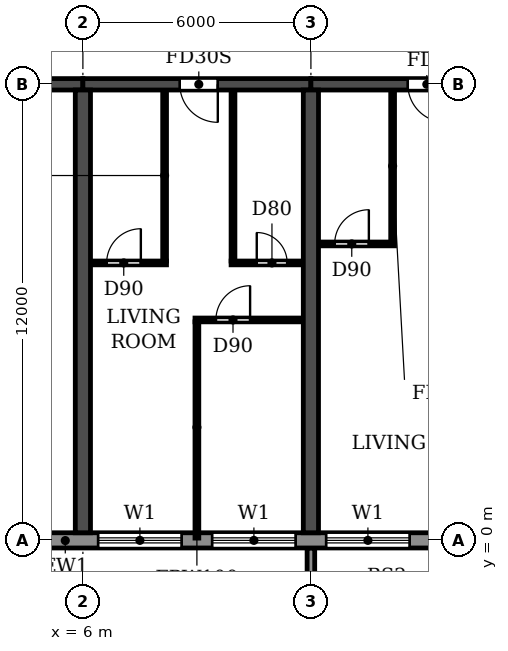
"""IFC4 building model, lengths in metres.
Left out: names, types, materials, properties, quantities, classifications, styles, units other than length and angle.
Written with IfcOpenShell. Run it as: python <this file> out.ifc"""

import sys

from ifc_helpers import new_model, si_unit, direction, frame, frame_2d, origin, place, context, subcontext, project, spatial, polyline, rectangle, outline, extrude, source, transform, mapped, element, fill, save


model = new_model("IFC4")
c1 = context("Model", 3, precision=1e-05, world=origin(), true_north=direction((0.0, 1.0)))
c2 = subcontext(c1, "Body", "Model", "MODEL_VIEW")
j1 = project(units=[si_unit("LENGTHUNIT", "METRE"), si_unit("PLANEANGLEUNIT", "RADIAN")], contexts=[c1])
p1 = place(None, origin())
s1 = spatial("IfcSite", under=j1, at=p1, CompositionType="ELEMENT")
p2 = place(p1, origin())
s2 = spatial("IfcBuilding", under=s1, at=p2, CompositionType="ELEMENT")
p3 = place(p2, frame((0.0, 0.0, 49.8)))
s3 = spatial("IfcBuildingStorey", under=s2, at=p3, CompositionType="ELEMENT", Elevation=49.8)
for number, where, z_axis, x_axis in (
    (1, (6.0, 0.2, 0.0), (0.0, 0.0, 1.0), (0.0, 1.0, 0.0)),
    (2, (12.0, 0.2, 0.0), (0.0, 0.0, 1.0), (0.0, 1.0, 0.0)),
):
    element("IfcWall", number, at=place(p3, frame(where, z_axis=z_axis, x_axis=x_axis)), inside=s3, PredefinedType="SHEAR", context=c2, shape_type="SweptSolid", body=[
        extrude(rectangle(XDim=11.65, YDim=0.4, at=frame_2d((5.825, 0.0))), origin(), (0.0, 0.0, 1.0), 3.0),
    ])
p4 = place(p3, frame((0.2, 12.0, 0.0), z_axis=(0.0, 0.0, 1.0), x_axis=(1.0, 0.0, 0.0)))
e3 = element("IfcWall", 3, at=p4, inside=s3, PredefinedType="SHEAR", context=c2, shape_type="SweptSolid", body=[
    extrude(rectangle(XDim=5.8, YDim=0.3, at=frame_2d((2.9, 0.0))), origin(), (0.0, 0.0, 1.0), 2.4),
])
p5 = place(p4, frame((2.3, 0.0, 0.0)))
e4 = element("IfcOpeningElement", 4, at=p5, cuts=e3, PredefinedType="OPENING", context=c2, shape_type="SweptSolid", body=[
    extrude(rectangle(XDim=1.0, YDim=2.1, at=frame_2d((0.5, 1.05))), frame((0.0, 0.16, 0.0), z_axis=(0.0, -1.0, 0.0), x_axis=(1.0, 0.0, 0.0)), (0.0, 0.0, 1.0), 0.32),
])
p6 = place(p3, frame((6.0, 12.0, 0.0), z_axis=(0.0, 0.0, 1.0), x_axis=(1.0, 0.0, 0.0)))
e5 = element("IfcWall", 5, at=p6, inside=s3, PredefinedType="SHEAR", context=c2, shape_type="SweptSolid", body=[
    extrude(rectangle(XDim=6.0, YDim=0.3, at=frame_2d((3.0, 0.0))), origin(), (0.0, 0.0, 1.0), 2.4),
])
p7 = place(p6, frame((2.55, 0.0, 0.0)))
e6 = element("IfcOpeningElement", 6, at=p7, cuts=e5, PredefinedType="OPENING", context=c2, shape_type="SweptSolid", body=[
    extrude(rectangle(XDim=1.0, YDim=2.1, at=frame_2d((0.5, 1.05))), frame((0.0, 0.16, 0.0), z_axis=(0.0, -1.0, 0.0), x_axis=(1.0, 0.0, 0.0)), (0.0, 0.0, 1.0), 0.32),
])
p8 = place(p3, frame((12.0, 12.0, 0.0), z_axis=(0.0, 0.0, 1.0), x_axis=(1.0, 0.0, 0.0)))
e7 = element("IfcWall", 7, at=p8, inside=s3, PredefinedType="SHEAR", context=c2, shape_type="SweptSolid", body=[
    extrude(rectangle(XDim=6.0, YDim=0.3, at=frame_2d((3.0, 0.0))), origin(), (0.0, 0.0, 1.0), 2.4),
])
p9 = place(p8, frame((2.55, 0.0, 0.0)))
e8 = element("IfcOpeningElement", 8, at=p9, cuts=e7, PredefinedType="OPENING", context=c2, shape_type="SweptSolid", body=[
    extrude(rectangle(XDim=1.0, YDim=2.1, at=frame_2d((0.5, 1.05))), frame((0.0, 0.16, 0.0), z_axis=(0.0, -1.0, 0.0), x_axis=(1.0, 0.0, 0.0)), (0.0, 0.0, 1.0), 0.32),
])
p10 = place(p3, frame((4.683, 0.0, 0.0), z_axis=(0.0, 0.0, 1.0), x_axis=(1.0, 0.0, 0.0)))
e9 = element("IfcWall", 9, at=p10, inside=s3, PredefinedType="STANDARD", context=c2, shape_type="SweptSolid", body=[
    extrude(rectangle(XDim=92.634, YDim=0.4, at=frame_2d((46.317, 0.0))), origin(), (0.0, 0.0, 1.0), 3.0),
])
p11 = place(p10, frame((1.717, 0.0, 0.9)))
e10 = element("IfcOpeningElement", 10, at=p11, cuts=e9, PredefinedType="OPENING", context=c2, shape_type="SweptSolid", body=[
    extrude(rectangle(XDim=2.2, YDim=1.5, at=frame_2d((1.1, 0.75))), frame((0.0, 0.21, 0.0), z_axis=(0.0, -1.0, 0.0), x_axis=(1.0, 0.0, 0.0)), (0.0, 0.0, 1.0), 0.42),
])
p12 = place(p10, frame((4.717, 0.0, 0.9)))
e11 = element("IfcOpeningElement", 11, at=p12, cuts=e9, PredefinedType="OPENING", context=c2, shape_type="SweptSolid", body=[
    extrude(rectangle(XDim=2.2, YDim=1.5, at=frame_2d((1.1, 0.75))), frame((0.0, 0.21, 0.0), z_axis=(0.0, -1.0, 0.0), x_axis=(1.0, 0.0, 0.0)), (0.0, 0.0, 1.0), 0.42),
])
p13 = place(p10, frame((7.717, 0.0, 0.9)))
e12 = element("IfcOpeningElement", 12, at=p13, cuts=e9, PredefinedType="OPENING", context=c2, shape_type="SweptSolid", body=[
    extrude(rectangle(XDim=2.2, YDim=1.5, at=frame_2d((1.1, 0.75))), frame((0.0, 0.21, 0.0), z_axis=(0.0, -1.0, 0.0), x_axis=(1.0, 0.0, 0.0)), (0.0, 0.0, 1.0), 0.42),
])
p14 = place(p10, frame((10.917, 0.0, 0.0)))
e13 = element("IfcOpeningElement", 13, at=p14, cuts=e9, PredefinedType="OPENING", context=c2, shape_type="SweptSolid", body=[
    extrude(rectangle(XDim=1.8, YDim=2.4, at=frame_2d((0.9, 1.2))), frame((0.0, 0.21, 0.0), z_axis=(0.0, -1.0, 0.0), x_axis=(1.0, 0.0, 0.0)), (0.0, 0.0, 1.0), 0.42),
])
p15 = place(p10, frame((13.717, 0.0, 0.9)))
e14 = element("IfcOpeningElement", 14, at=p15, cuts=e9, PredefinedType="OPENING", context=c2, shape_type="SweptSolid", body=[
    extrude(rectangle(XDim=2.2, YDim=1.5, at=frame_2d((1.1, 0.75))), frame((0.0, 0.21, 0.0), z_axis=(0.0, -1.0, 0.0), x_axis=(1.0, 0.0, 0.0)), (0.0, 0.0, 1.0), 0.42),
])
p16 = place(p10, frame((16.717, 0.0, 0.9)))
e15 = element("IfcOpeningElement", 15, at=p16, cuts=e9, PredefinedType="OPENING", context=c2, shape_type="SweptSolid", body=[
    extrude(rectangle(XDim=2.2, YDim=1.5, at=frame_2d((1.1, 0.75))), frame((0.0, 0.21, 0.0), z_axis=(0.0, -1.0, 0.0), x_axis=(1.0, 0.0, 0.0)), (0.0, 0.0, 1.0), 0.42),
])
p17 = place(p10, frame((19.917, 0.0, 0.0)))
e16 = element("IfcOpeningElement", 16, at=p17, cuts=e9, PredefinedType="OPENING", context=c2, shape_type="SweptSolid", body=[
    extrude(rectangle(XDim=1.8, YDim=2.4, at=frame_2d((0.9, 1.2))), frame((0.0, 0.21, 0.0), z_axis=(0.0, -1.0, 0.0), x_axis=(1.0, 0.0, 0.0)), (0.0, 0.0, 1.0), 0.42),
])
p18 = place(p10, frame((22.717, 0.0, 0.9)))
e17 = element("IfcOpeningElement", 17, at=p18, cuts=e9, PredefinedType="OPENING", context=c2, shape_type="SweptSolid", body=[
    extrude(rectangle(XDim=2.2, YDim=1.5, at=frame_2d((1.1, 0.75))), frame((0.0, 0.21, 0.0), z_axis=(0.0, -1.0, 0.0), x_axis=(1.0, 0.0, 0.0)), (0.0, 0.0, 1.0), 0.42),
])
p19 = place(p10, frame((25.717, 0.0, 0.9)))
e18 = element("IfcOpeningElement", 18, at=p19, cuts=e9, PredefinedType="OPENING", context=c2, shape_type="SweptSolid", body=[
    extrude(rectangle(XDim=2.2, YDim=1.5, at=frame_2d((1.1, 0.75))), frame((0.0, 0.21, 0.0), z_axis=(0.0, -1.0, 0.0), x_axis=(1.0, 0.0, 0.0)), (0.0, 0.0, 1.0), 0.42),
])
p20 = place(p10, frame((28.717, 0.0, 0.9)))
e19 = element("IfcOpeningElement", 19, at=p20, cuts=e9, PredefinedType="OPENING", context=c2, shape_type="SweptSolid", body=[
    extrude(rectangle(XDim=2.2, YDim=1.5, at=frame_2d((1.1, 0.75))), frame((0.0, 0.21, 0.0), z_axis=(0.0, -1.0, 0.0), x_axis=(1.0, 0.0, 0.0)), (0.0, 0.0, 1.0), 0.42),
])
p21 = place(p10, frame((31.717, 0.0, 0.9)))
e20 = element("IfcOpeningElement", 20, at=p21, cuts=e9, PredefinedType="OPENING", context=c2, shape_type="SweptSolid", body=[
    extrude(rectangle(XDim=2.2, YDim=1.5, at=frame_2d((1.1, 0.75))), frame((0.0, 0.21, 0.0), z_axis=(0.0, -1.0, 0.0), x_axis=(1.0, 0.0, 0.0)), (0.0, 0.0, 1.0), 0.42),
])
p22 = place(p10, frame((34.917, 0.0, 0.0)))
e21 = element("IfcOpeningElement", 21, at=p22, cuts=e9, PredefinedType="OPENING", context=c2, shape_type="SweptSolid", body=[
    extrude(rectangle(XDim=1.8, YDim=2.4, at=frame_2d((0.9, 1.2))), frame((0.0, 0.21, 0.0), z_axis=(0.0, -1.0, 0.0), x_axis=(1.0, 0.0, 0.0)), (0.0, 0.0, 1.0), 0.42),
])
p23 = place(p10, frame((37.717, 0.0, 0.9)))
e22 = element("IfcOpeningElement", 22, at=p23, cuts=e9, PredefinedType="OPENING", context=c2, shape_type="SweptSolid", body=[
    extrude(rectangle(XDim=2.2, YDim=1.5, at=frame_2d((1.1, 0.75))), frame((0.0, 0.21, 0.0), z_axis=(0.0, -1.0, 0.0), x_axis=(1.0, 0.0, 0.0)), (0.0, 0.0, 1.0), 0.42),
])
p24 = place(p10, frame((40.717, 0.0, 0.9)))
e23 = element("IfcOpeningElement", 23, at=p24, cuts=e9, PredefinedType="OPENING", context=c2, shape_type="SweptSolid", body=[
    extrude(rectangle(XDim=2.2, YDim=1.5, at=frame_2d((1.1, 0.75))), frame((0.0, 0.21, 0.0), z_axis=(0.0, -1.0, 0.0), x_axis=(1.0, 0.0, 0.0)), (0.0, 0.0, 1.0), 0.42),
])
p25 = place(p10, frame((43.717, 0.0, 0.9)))
e24 = element("IfcOpeningElement", 24, at=p25, cuts=e9, PredefinedType="OPENING", context=c2, shape_type="SweptSolid", body=[
    extrude(rectangle(XDim=2.2, YDim=1.5, at=frame_2d((1.1, 0.75))), frame((0.0, 0.21, 0.0), z_axis=(0.0, -1.0, 0.0), x_axis=(1.0, 0.0, 0.0)), (0.0, 0.0, 1.0), 0.42),
])
p26 = place(p10, frame((46.917, 0.0, 0.0)))
e25 = element("IfcOpeningElement", 25, at=p26, cuts=e9, PredefinedType="OPENING", context=c2, shape_type="SweptSolid", body=[
    extrude(rectangle(XDim=1.8, YDim=2.4, at=frame_2d((0.9, 1.2))), frame((0.0, 0.21, 0.0), z_axis=(0.0, -1.0, 0.0), x_axis=(1.0, 0.0, 0.0)), (0.0, 0.0, 1.0), 0.42),
])
p27 = place(p10, frame((49.717, 0.0, 0.9)))
e26 = element("IfcOpeningElement", 26, at=p27, cuts=e9, PredefinedType="OPENING", context=c2, shape_type="SweptSolid", body=[
    extrude(rectangle(XDim=2.2, YDim=1.5, at=frame_2d((1.1, 0.75))), frame((0.0, 0.21, 0.0), z_axis=(0.0, -1.0, 0.0), x_axis=(1.0, 0.0, 0.0)), (0.0, 0.0, 1.0), 0.42),
])
p28 = place(p10, frame((52.717, 0.0, 0.9)))
e27 = element("IfcOpeningElement", 27, at=p28, cuts=e9, PredefinedType="OPENING", context=c2, shape_type="SweptSolid", body=[
    extrude(rectangle(XDim=2.2, YDim=1.5, at=frame_2d((1.1, 0.75))), frame((0.0, 0.21, 0.0), z_axis=(0.0, -1.0, 0.0), x_axis=(1.0, 0.0, 0.0)), (0.0, 0.0, 1.0), 0.42),
])
p29 = place(p10, frame((55.717, 0.0, 0.9)))
e28 = element("IfcOpeningElement", 28, at=p29, cuts=e9, PredefinedType="OPENING", context=c2, shape_type="SweptSolid", body=[
    extrude(rectangle(XDim=2.2, YDim=1.5, at=frame_2d((1.1, 0.75))), frame((0.0, 0.21, 0.0), z_axis=(0.0, -1.0, 0.0), x_axis=(1.0, 0.0, 0.0)), (0.0, 0.0, 1.0), 0.42),
])
p30 = place(p10, frame((58.917, 0.0, 0.0)))
e29 = element("IfcOpeningElement", 29, at=p30, cuts=e9, PredefinedType="OPENING", context=c2, shape_type="SweptSolid", body=[
    extrude(rectangle(XDim=1.8, YDim=2.4, at=frame_2d((0.9, 1.2))), frame((0.0, 0.21, 0.0), z_axis=(0.0, -1.0, 0.0), x_axis=(1.0, 0.0, 0.0)), (0.0, 0.0, 1.0), 0.42),
])
p31 = place(p10, frame((61.717, 0.0, 0.9)))
e30 = element("IfcOpeningElement", 30, at=p31, cuts=e9, PredefinedType="OPENING", context=c2, shape_type="SweptSolid", body=[
    extrude(rectangle(XDim=2.2, YDim=1.5, at=frame_2d((1.1, 0.75))), frame((0.0, 0.21, 0.0), z_axis=(0.0, -1.0, 0.0), x_axis=(1.0, 0.0, 0.0)), (0.0, 0.0, 1.0), 0.42),
])
p32 = place(p10, frame((64.717, 0.0, 0.9)))
e31 = element("IfcOpeningElement", 31, at=p32, cuts=e9, PredefinedType="OPENING", context=c2, shape_type="SweptSolid", body=[
    extrude(rectangle(XDim=2.2, YDim=1.5, at=frame_2d((1.1, 0.75))), frame((0.0, 0.21, 0.0), z_axis=(0.0, -1.0, 0.0), x_axis=(1.0, 0.0, 0.0)), (0.0, 0.0, 1.0), 0.42),
])
p33 = place(p10, frame((67.717, 0.0, 0.9)))
e32 = element("IfcOpeningElement", 32, at=p33, cuts=e9, PredefinedType="OPENING", context=c2, shape_type="SweptSolid", body=[
    extrude(rectangle(XDim=2.2, YDim=1.5, at=frame_2d((1.1, 0.75))), frame((0.0, 0.21, 0.0), z_axis=(0.0, -1.0, 0.0), x_axis=(1.0, 0.0, 0.0)), (0.0, 0.0, 1.0), 0.42),
])
p34 = place(p10, frame((70.917, 0.0, 0.0)))
e33 = element("IfcOpeningElement", 33, at=p34, cuts=e9, PredefinedType="OPENING", context=c2, shape_type="SweptSolid", body=[
    extrude(rectangle(XDim=1.8, YDim=2.4, at=frame_2d((0.9, 1.2))), frame((0.0, 0.21, 0.0), z_axis=(0.0, -1.0, 0.0), x_axis=(1.0, 0.0, 0.0)), (0.0, 0.0, 1.0), 0.42),
])
p35 = place(p10, frame((73.717, 0.0, 0.9)))
e34 = element("IfcOpeningElement", 34, at=p35, cuts=e9, PredefinedType="OPENING", context=c2, shape_type="SweptSolid", body=[
    extrude(rectangle(XDim=2.2, YDim=1.5, at=frame_2d((1.1, 0.75))), frame((0.0, 0.21, 0.0), z_axis=(0.0, -1.0, 0.0), x_axis=(1.0, 0.0, 0.0)), (0.0, 0.0, 1.0), 0.42),
])
p36 = place(p10, frame((76.717, 0.0, 0.9)))
e35 = element("IfcOpeningElement", 35, at=p36, cuts=e9, PredefinedType="OPENING", context=c2, shape_type="SweptSolid", body=[
    extrude(rectangle(XDim=2.2, YDim=1.5, at=frame_2d((1.1, 0.75))), frame((0.0, 0.21, 0.0), z_axis=(0.0, -1.0, 0.0), x_axis=(1.0, 0.0, 0.0)), (0.0, 0.0, 1.0), 0.42),
])
p37 = place(p10, frame((79.717, 0.0, 0.9)))
e36 = element("IfcOpeningElement", 36, at=p37, cuts=e9, PredefinedType="OPENING", context=c2, shape_type="SweptSolid", body=[
    extrude(rectangle(XDim=2.2, YDim=1.5, at=frame_2d((1.1, 0.75))), frame((0.0, 0.21, 0.0), z_axis=(0.0, -1.0, 0.0), x_axis=(1.0, 0.0, 0.0)), (0.0, 0.0, 1.0), 0.42),
])
p38 = place(p10, frame((82.917, 0.0, 0.0)))
e37 = element("IfcOpeningElement", 37, at=p38, cuts=e9, PredefinedType="OPENING", context=c2, shape_type="SweptSolid", body=[
    extrude(rectangle(XDim=1.8, YDim=2.4, at=frame_2d((0.9, 1.2))), frame((0.0, 0.21, 0.0), z_axis=(0.0, -1.0, 0.0), x_axis=(1.0, 0.0, 0.0)), (0.0, 0.0, 1.0), 0.42),
])
p39 = place(p10, frame((85.717, 0.0, 0.9)))
e38 = element("IfcOpeningElement", 38, at=p39, cuts=e9, PredefinedType="OPENING", context=c2, shape_type="SweptSolid", body=[
    extrude(rectangle(XDim=2.2, YDim=1.5, at=frame_2d((1.1, 0.75))), frame((0.0, 0.21, 0.0), z_axis=(0.0, -1.0, 0.0), x_axis=(1.0, 0.0, 0.0)), (0.0, 0.0, 1.0), 0.42),
])
p40 = place(p10, frame((88.717, 0.0, 0.9)))
e39 = element("IfcOpeningElement", 39, at=p40, cuts=e9, PredefinedType="OPENING", context=c2, shape_type="SweptSolid", body=[
    extrude(rectangle(XDim=2.2, YDim=1.5, at=frame_2d((1.1, 0.75))), frame((0.0, 0.21, 0.0), z_axis=(0.0, -1.0, 0.0), x_axis=(1.0, 0.0, 0.0)), (0.0, 0.0, 1.0), 0.42),
])
m1 = source(origin(), c2, "Body", "SweptSolid", [
    extrude(outline(polyline([(0.0, 0.0), (0.2, 0.0), (0.2, 1.65), (0.0, 1.65), (0.0, 0.0)])), origin(), (0.0, 0.0, 1.0), 3.1),
])
p41 = place(p3, frame((11.9, -1.85, 0.0)))
e40 = element("IfcWall", 40, at=p41, inside=s3, PredefinedType="STANDARD", context=c2, shape_type="MappedRepresentation", body=[
    mapped(m1, transform((0.0, 0.0, 0.0))),
])
p42 = place(p3, frame((8.95, 5.8, 0.0), z_axis=(0.0, 0.0, 1.0), x_axis=(1.0, 0.0, 0.0)))
e41 = element("IfcWall", 41, at=p42, inside=s3, PredefinedType="PARTITIONING", context=c2, shape_type="SweptSolid", body=[
    extrude(rectangle(XDim=2.84, YDim=0.1, at=frame_2d((1.42, 0.0))), origin(), (0.0, 0.0, 1.0), 3.0),
])
p43 = place(p42, frame((0.55, 0.0, 0.0)))
e42 = element("IfcOpeningElement", 42, at=p43, cuts=e41, PredefinedType="OPENING", context=c2, shape_type="SweptSolid", body=[
    extrude(rectangle(XDim=0.9, YDim=2.1, at=frame_2d((0.45, 1.05))), frame((0.0, 0.06, 0.0), z_axis=(0.0, -1.0, 0.0), x_axis=(1.0, 0.0, 0.0)), (0.0, 0.0, 1.0), 0.12),
])
p44 = place(p3, frame((6.21, 7.3, 0.0), z_axis=(0.0, 0.0, 1.0), x_axis=(1.0, 0.0, 0.0)))
e43 = element("IfcWall", 43, at=p44, inside=s3, PredefinedType="PARTITIONING", context=c2, shape_type="SweptSolid", body=[
    extrude(rectangle(XDim=1.99, YDim=0.1, at=frame_2d((0.995, 0.0))), origin(), (0.0, 0.0, 1.0), 3.0),
])
p45 = place(p44, frame((0.415, 0.0, 0.0)))
e44 = element("IfcOpeningElement", 44, at=p45, cuts=e43, PredefinedType="OPENING", context=c2, shape_type="SweptSolid", body=[
    extrude(rectangle(XDim=0.9, YDim=2.1, at=frame_2d((0.45, 1.05))), frame((0.0, 0.06, 0.0), z_axis=(0.0, -1.0, 0.0), x_axis=(1.0, 0.0, 0.0)), (0.0, 0.0, 1.0), 0.12),
])
p46 = place(p3, frame((9.9, 7.3, 0.0), z_axis=(0.0, 0.0, 1.0), x_axis=(1.0, 0.0, 0.0)))
e45 = element("IfcWall", 45, at=p46, inside=s3, PredefinedType="PARTITIONING", context=c2, shape_type="SweptSolid", body=[
    extrude(rectangle(XDim=1.89, YDim=0.1, at=frame_2d((0.945, 0.0))), origin(), (0.0, 0.0, 1.0), 3.0),
])
p47 = place(p46, frame((0.675, 0.0, 0.0)))
e46 = element("IfcOpeningElement", 46, at=p47, cuts=e45, PredefinedType="OPENING", context=c2, shape_type="SweptSolid", body=[
    extrude(rectangle(XDim=0.8, YDim=2.1, at=frame_2d((0.4, 1.05))), frame((0.0, 0.06, 0.0), z_axis=(0.0, -1.0, 0.0), x_axis=(1.0, 0.0, 0.0)), (0.0, 0.0, 1.0), 0.12),
])
p48 = place(p3, frame((12.21, 7.8, 0.0), z_axis=(0.0, 0.0, 1.0), x_axis=(1.0, 0.0, 0.0)))
e47 = element("IfcWall", 47, at=p48, inside=s3, PredefinedType="PARTITIONING", context=c2, shape_type="SweptSolid", body=[
    extrude(rectangle(XDim=1.99, YDim=0.1, at=frame_2d((0.995, 0.0))), origin(), (0.0, 0.0, 1.0), 3.0),
])
p49 = place(p48, frame((0.415, 0.0, 0.0)))
e48 = element("IfcOpeningElement", 48, at=p49, cuts=e47, PredefinedType="OPENING", context=c2, shape_type="SweptSolid", body=[
    extrude(rectangle(XDim=0.9, YDim=2.1, at=frame_2d((0.45, 1.05))), frame((0.0, 0.06, 0.0), z_axis=(0.0, -1.0, 0.0), x_axis=(1.0, 0.0, 0.0)), (0.0, 0.0, 1.0), 0.12),
])
p50 = place(p3, frame((8.15, 7.35, 0.0), z_axis=(0.0, 0.0, 1.0), x_axis=(0.0, 1.0, 0.0)))
e49 = element("IfcWall", 49, at=p50, inside=s3, PredefinedType="PARTITIONING", context=c2, shape_type="SweptSolid", body=[
    extrude(rectangle(XDim=4.49, YDim=0.1, at=frame_2d((2.245, 0.0))), origin(), (0.0, 0.0, 1.0), 3.0),
])
p51 = place(p3, frame((9.0, 0.06, 0.0), z_axis=(0.0, 0.0, 1.0), x_axis=(0.0, 1.0, 0.0)))
e50 = element("IfcWall", 50, at=p51, inside=s3, PredefinedType="PARTITIONING", context=c2, shape_type="SweptSolid", body=[
    extrude(rectangle(XDim=5.69, YDim=0.1, at=frame_2d((2.845, 0.0))), origin(), (0.0, 0.0, 1.0), 3.0),
])
p52 = place(p3, frame((9.95, 7.35, 0.0), z_axis=(0.0, 0.0, 1.0), x_axis=(0.0, 1.0, 0.0)))
e51 = element("IfcWall", 51, at=p52, inside=s3, PredefinedType="PARTITIONING", context=c2, shape_type="SweptSolid", body=[
    extrude(rectangle(XDim=4.49, YDim=0.1, at=frame_2d((2.245, 0.0))), origin(), (0.0, 0.0, 1.0), 3.0),
])
p53 = place(p3, frame((14.15, 7.85, 0.0), z_axis=(0.0, 0.0, 1.0), x_axis=(0.0, 1.0, 0.0)))
e52 = element("IfcWall", 52, at=p53, inside=s3, PredefinedType="PARTITIONING", context=c2, shape_type="SweptSolid", body=[
    extrude(rectangle(XDim=3.99, YDim=0.1, at=frame_2d((1.995, 0.0))), origin(), (0.0, 0.0, 1.0), 3.0),
])
p54 = place(p11, origin())
e53 = element("IfcWindow", 53, at=p54, inside=s3, PartitioningType="DOUBLE_PANEL_HORIZONTAL", PredefinedType="WINDOW", context=c2, shape_type="SweptSolid", body=[
    extrude(rectangle(XDim=2.2, YDim=1.5, at=frame_2d((1.1, 0.75))), frame((0.0, 0.03, 0.0), z_axis=(0.0, -1.0, 0.0), x_axis=(1.0, 0.0, 0.0)), (0.0, 0.0, 1.0), 0.06),
])
fill(e10, e53)
p55 = place(p12, origin())
e54 = element("IfcWindow", 54, at=p55, inside=s3, PartitioningType="DOUBLE_PANEL_HORIZONTAL", PredefinedType="WINDOW", context=c2, shape_type="SweptSolid", body=[
    extrude(rectangle(XDim=2.2, YDim=1.5, at=frame_2d((1.1, 0.75))), frame((0.0, 0.03, 0.0), z_axis=(0.0, -1.0, 0.0), x_axis=(1.0, 0.0, 0.0)), (0.0, 0.0, 1.0), 0.06),
])
fill(e11, e54)
p56 = place(p13, origin())
e55 = element("IfcWindow", 55, at=p56, inside=s3, PartitioningType="DOUBLE_PANEL_HORIZONTAL", PredefinedType="WINDOW", context=c2, shape_type="SweptSolid", body=[
    extrude(rectangle(XDim=2.2, YDim=1.5, at=frame_2d((1.1, 0.75))), frame((0.0, 0.03, 0.0), z_axis=(0.0, -1.0, 0.0), x_axis=(1.0, 0.0, 0.0)), (0.0, 0.0, 1.0), 0.06),
])
fill(e12, e55)
p57 = place(p45, origin())
e56 = element("IfcDoor", 56, at=p57, inside=s3, OperationType="SINGLE_SWING_RIGHT", PredefinedType="DOOR", context=c2, shape_type="SweptSolid", body=[
    extrude(rectangle(XDim=0.9, YDim=2.1, at=frame_2d((0.45, 1.05))), frame((0.0, 0.025, 0.0), z_axis=(0.0, -1.0, 0.0), x_axis=(1.0, 0.0, 0.0)), (0.0, 0.0, 1.0), 0.05),
])
fill(e44, e56)
p58 = place(p7, frame((1.0, 0.0, 0.0), z_axis=(0.0, 0.0, 1.0), x_axis=(-1.0, 0.0, 0.0)))
e57 = element("IfcDoor", 57, at=p58, inside=s3, OperationType="SINGLE_SWING_LEFT", PredefinedType="DOOR", context=c2, shape_type="SweptSolid", body=[
    extrude(rectangle(XDim=1.0, YDim=2.1, at=frame_2d((0.5, 1.05))), frame((0.0, 0.025, 0.0), z_axis=(0.0, -1.0, 0.0), x_axis=(1.0, 0.0, 0.0)), (0.0, 0.0, 1.0), 0.05),
])
fill(e6, e57)
p59 = place(p43, origin())
e58 = element("IfcDoor", 58, at=p59, inside=s3, OperationType="SINGLE_SWING_RIGHT", PredefinedType="DOOR", context=c2, shape_type="SweptSolid", body=[
    extrude(rectangle(XDim=0.9, YDim=2.1, at=frame_2d((0.45, 1.05))), frame((0.0, 0.025, 0.0), z_axis=(0.0, -1.0, 0.0), x_axis=(1.0, 0.0, 0.0)), (0.0, 0.0, 1.0), 0.05),
])
fill(e42, e58)
p60 = place(p47, origin())
e59 = element("IfcDoor", 59, at=p60, inside=s3, OperationType="SINGLE_SWING_LEFT", PredefinedType="DOOR", context=c2, shape_type="SweptSolid", body=[
    extrude(rectangle(XDim=0.8, YDim=2.1, at=frame_2d((0.4, 1.05))), frame((0.0, 0.025, 0.0), z_axis=(0.0, -1.0, 0.0), x_axis=(1.0, 0.0, 0.0)), (0.0, 0.0, 1.0), 0.05),
])
fill(e46, e59)
p61 = place(p49, origin())
e60 = element("IfcDoor", 60, at=p61, inside=s3, OperationType="SINGLE_SWING_RIGHT", PredefinedType="DOOR", context=c2, shape_type="SweptSolid", body=[
    extrude(rectangle(XDim=0.9, YDim=2.1, at=frame_2d((0.45, 1.05))), frame((0.0, 0.025, 0.0), z_axis=(0.0, -1.0, 0.0), x_axis=(1.0, 0.0, 0.0)), (0.0, 0.0, 1.0), 0.05),
])
fill(e48, e60)
p62 = place(p9, frame((1.0, 0.0, 0.0), z_axis=(0.0, 0.0, 1.0), x_axis=(-1.0, 0.0, 0.0)))
e61 = element("IfcDoor", 61, at=p62, inside=s3, OperationType="SINGLE_SWING_LEFT", PredefinedType="DOOR", context=c2, shape_type="SweptSolid", body=[
    extrude(rectangle(XDim=1.0, YDim=2.1, at=frame_2d((0.5, 1.05))), frame((0.0, 0.025, 0.0), z_axis=(0.0, -1.0, 0.0), x_axis=(1.0, 0.0, 0.0)), (0.0, 0.0, 1.0), 0.05),
])
fill(e8, e61)
save(model, sys.argv[1])
